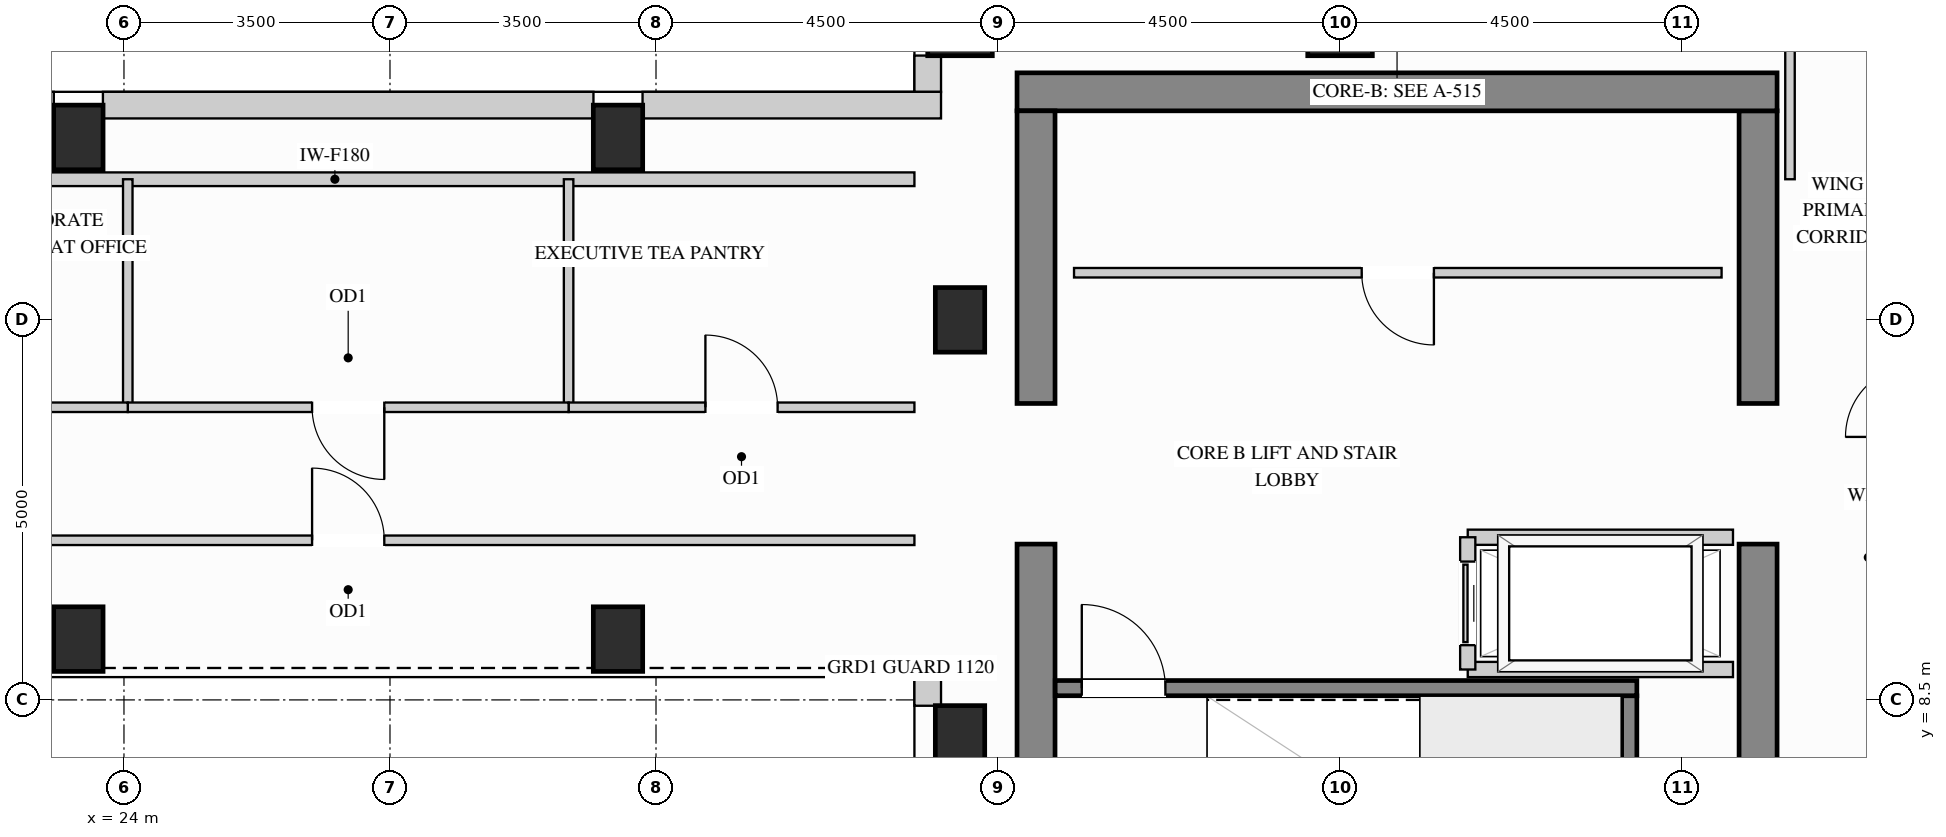
"""IFC4 building model, lengths in metres.
Left out: names, types, materials, properties, quantities, classifications, styles, units other than length and angle.
Written with IfcOpenShell. Run it as: python <this file> out.ifc"""

import sys

from ifc_helpers import new_model, si_unit, direction, frame, frame_2d, origin, origin_2d, place, context, subcontext, project, spatial, rectangle, extrude, source, transform, mapped, element, fill, save


model = new_model("IFC4")
c1 = context("Model", 3, precision=1e-05, world=origin(), true_north=direction((0.0, 1.0)))
c2 = subcontext(c1, "Body", "Model", "MODEL_VIEW")
j1 = project(units=[si_unit("LENGTHUNIT", "METRE"), si_unit("PLANEANGLEUNIT", "RADIAN")], contexts=[c1])
p1 = place(None, origin())
s1 = spatial("IfcSite", under=j1, at=p1, CompositionType="ELEMENT")
p2 = place(p1, origin())
s2 = spatial("IfcBuilding", under=s1, at=p2, CompositionType="ELEMENT")
p3 = place(p2, frame((0.0, 0.0, 244.8)))
s3 = spatial("IfcBuildingStorey", under=s2, at=p3, CompositionType="ELEMENT", Elevation=244.8)
m1 = source(origin(), c2, "Body", "SweptSolid", [
    extrude(rectangle(XDim=0.65, YDim=0.85, at=origin_2d()), origin(), (0.0, 0.0, 1.0), 3.4),
])
for number, where, z_axis, x_axis in (
    (1, (35.0, 13.5, 0.0), (0.0, 0.0, 1.0), (1.0, 0.0, 0.0)),
    (2, (35.0, 8.0, 0.0), (0.0, 0.0, 1.0), (1.0, 0.0, 0.0)),
    (3, (23.4, 15.9, 0.0), (0.0, 0.0, 1.0), (1.0, 0.0, 0.0)),
    (4, (23.4, 9.3, 0.0), (0.0, 0.0, 1.0), (1.0, 0.0, 0.0)),
    (5, (30.5, 15.9, 0.0), (0.0, 0.0, 1.0), (1.0, 0.0, 0.0)),
    (6, (30.5, 9.3, 0.0), (0.0, 0.0, 1.0), (1.0, 0.0, 0.0)),
):
    element("IfcColumn", number, at=place(p3, frame(where, z_axis=z_axis, x_axis=x_axis)), inside=s3, PredefinedType="COLUMN", context=c2, shape_type="MappedRepresentation", body=[
        mapped(m1, transform((0.0, 0.0, 0.0), x_axis=(1.0, 0.0, 0.0), y_axis=(0.0, 1.0, 0.0), z_axis=(0.0, 0.0, 1.0))),
    ])
m2 = source(origin(), c2, "Body", "SweptSolid", [
    extrude(rectangle(XDim=0.85, YDim=0.85, at=origin_2d()), origin(), (0.0, 0.0, 1.0), 3.4),
])
for number, where, z_axis, x_axis in (
    (7, (35.0, 17.4, 0.0), (0.0, 0.0, 1.0), (1.0, 0.0, 0.0)),
    (8, (40.0, 17.4, 0.0), (0.0, 0.0, 1.0), (1.0, 0.0, 0.0)),
):
    element("IfcColumn", number, at=place(p3, frame(where, z_axis=z_axis, x_axis=x_axis)), inside=s3, PredefinedType="COLUMN", context=c2, shape_type="MappedRepresentation", body=[
        mapped(m2, transform((0.0, 0.0, 0.0), x_axis=(1.0, 0.0, 0.0), y_axis=(0.0, 1.0, 0.0), z_axis=(0.0, 0.0, 1.0))),
    ])
m3 = source(origin(), c2, "Body", "SweptSolid", [
    extrude(rectangle(XDim=5.8, YDim=0.5, at=frame_2d((2.9, 0.0))), origin(), (0.0, 0.0, 1.0), 3.4),
])
p4 = place(p3, frame((45.5, 4.75, 0.0), z_axis=(0.0, 0.0, 1.0), x_axis=(0.0, 1.0, 0.0)))
e9 = element("IfcWall", 9, at=p4, inside=s3, PredefinedType="SHEAR", context=c2, shape_type="MappedRepresentation", body=[
    mapped(m3, transform((0.0, 0.0, 0.0), x_axis=(1.0, 0.0, 0.0), y_axis=(0.0, 1.0, 0.0), z_axis=(0.0, 0.0, 1.0))),
])
m4 = source(origin(), c2, "Body", "SweptSolid", [
    extrude(rectangle(XDim=3.85, YDim=0.5, at=frame_2d((1.925, 0.0))), origin(), (0.0, 0.0, 1.0), 3.4),
])
p5 = place(p3, frame((45.5, 12.4, 0.0), z_axis=(0.0, 0.0, 1.0), x_axis=(0.0, 1.0, 0.0)))
e10 = element("IfcWall", 10, at=p5, inside=s3, PredefinedType="SHEAR", context=c2, shape_type="MappedRepresentation", body=[
    mapped(m4, transform((0.0, 0.0, 0.0), x_axis=(1.0, 0.0, 0.0), y_axis=(0.0, 1.0, 0.0), z_axis=(0.0, 0.0, 1.0))),
])
m5 = source(origin(), c2, "Body", "SweptSolid", [
    extrude(rectangle(XDim=10.0, YDim=0.5, at=frame_2d((5.0, 0.0))), origin(), (0.0, 0.0, 1.0), 3.4),
])
p6 = place(p3, frame((35.75, 16.5, 0.0), z_axis=(0.0, 0.0, 1.0), x_axis=(1.0, 0.0, 0.0)))
e11 = element("IfcWall", 11, at=p6, inside=s3, PredefinedType="SHEAR", context=c2, shape_type="MappedRepresentation", body=[
    mapped(m5, transform((0.0, 0.0, 0.0), x_axis=(1.0, 0.0, 0.0), y_axis=(0.0, 1.0, 0.0), z_axis=(0.0, 0.0, 1.0))),
])
p7 = place(p3, frame((36.0, 4.75, 0.0), z_axis=(0.0, 0.0, 1.0), x_axis=(0.0, 1.0, 0.0)))
e12 = element("IfcWall", 12, at=p7, inside=s3, PredefinedType="SHEAR", context=c2, shape_type="MappedRepresentation", body=[
    mapped(m3, transform((0.0, 0.0, 0.0), x_axis=(1.0, 0.0, 0.0), y_axis=(0.0, 1.0, 0.0), z_axis=(0.0, 0.0, 1.0))),
])
p8 = place(p3, frame((36.0, 12.4, 0.0), z_axis=(0.0, 0.0, 1.0), x_axis=(0.0, 1.0, 0.0)))
e13 = element("IfcWall", 13, at=p8, inside=s3, PredefinedType="SHEAR", context=c2, shape_type="MappedRepresentation", body=[
    mapped(m4, transform((0.0, 0.0, 0.0), x_axis=(1.0, 0.0, 0.0), y_axis=(0.0, 1.0, 0.0), z_axis=(0.0, 0.0, 1.0))),
])
m6 = source(origin(), c2, "Body", "SweptSolid", [
    extrude(rectangle(XDim=0.379, YDim=0.35, at=frame_2d((0.189, 0.0))), origin(), (0.0, 0.0, 1.0), 3.385),
])
p9 = place(p3, frame((34.575, 8.802, 0.0), z_axis=(0.0, 0.0, 1.0), x_axis=(0.0, -1.0, 0.0)))
e14 = element("IfcWall", 14, at=p9, inside=s3, PredefinedType="SOLIDWALL", context=c2, shape_type="MappedRepresentation", body=[
    mapped(m6, transform((0.0, 0.0, 0.0), x_axis=(1.0, 0.0, 0.0), y_axis=(0.0, 1.0, 0.0), z_axis=(0.0, 0.0, 1.0))),
])
m7 = source(origin(), c2, "Body", "SweptSolid", [
    extrude(rectangle(XDim=0.479, YDim=0.35, at=frame_2d((0.24, 0.0))), origin(), (0.0, 0.0, 1.0), 3.385),
])
p10 = place(p3, frame((34.575, 16.977, 0.0), z_axis=(0.0, 0.0, 1.0), x_axis=(0.0, -1.0, 0.0)))
e15 = element("IfcWall", 15, at=p10, inside=s3, PredefinedType="SOLIDWALL", context=c2, shape_type="MappedRepresentation", body=[
    mapped(m7, transform((0.0, 0.0, 0.0), x_axis=(1.0, 0.0, 0.0), y_axis=(0.0, 1.0, 0.0), z_axis=(0.0, 0.0, 1.0))),
])
m8 = source(origin(), c2, "Body", "SweptSolid", [
    extrude(rectangle(XDim=3.927, YDim=0.35, at=frame_2d((1.963, 0.0))), origin(), (0.0, 0.0, 1.0), 3.385),
])
p11 = place(p3, frame((34.75, 16.325, 0.0), z_axis=(0.0, 0.0, 1.0), x_axis=(-1.0, 0.0, 0.0)))
e16 = element("IfcWall", 16, at=p11, inside=s3, PredefinedType="SOLIDWALL", context=c2, shape_type="MappedRepresentation", body=[
    mapped(m8, transform((0.0, 0.0, 0.0), x_axis=(1.0, 0.0, 0.0), y_axis=(0.0, 1.0, 0.0), z_axis=(0.0, 0.0, 1.0))),
])
m9 = source(origin(), c2, "Body", "SweptSolid", [
    extrude(rectangle(XDim=6.454, YDim=0.35, at=frame_2d((3.227, 0.0))), origin(), (0.0, 0.0, 1.0), 3.385),
])
p12 = place(p3, frame((30.177, 16.325, 0.0), z_axis=(0.0, 0.0, 1.0), x_axis=(-1.0, 0.0, 0.0)))
e17 = element("IfcWall", 17, at=p12, inside=s3, PredefinedType="SOLIDWALL", context=c2, shape_type="MappedRepresentation", body=[
    mapped(m9, transform((0.0, 0.0, 0.0), x_axis=(1.0, 0.0, 0.0), y_axis=(0.0, 1.0, 0.0), z_axis=(0.0, 0.0, 1.0))),
])
p13 = place(p3, frame((23.077, 16.325, 0.0), z_axis=(0.0, 0.0, 1.0), x_axis=(-1.0, 0.0, 0.0)))
e18 = element("IfcWall", 18, at=p13, inside=s3, PredefinedType="SOLIDWALL", context=c2, shape_type="MappedRepresentation", body=[
    mapped(m8, transform((0.0, 0.0, 0.0), x_axis=(1.0, 0.0, 0.0), y_axis=(0.0, 1.0, 0.0), z_axis=(0.0, 0.0, 1.0))),
])
m10 = source(origin(), c2, "Body", "SweptSolid", [
    extrude(rectangle(XDim=15.25, YDim=0.18, at=frame_2d((7.625, 0.0))), origin(), (0.0, 0.0, 1.0), 3.385),
])
p14 = place(p3, frame((19.15, 15.35, 0.0), z_axis=(0.0, 0.0, 1.0), x_axis=(1.0, 0.0, 0.0)))
e19 = element("IfcWall", 19, at=p14, inside=s3, PredefinedType="PARTITIONING", context=c2, shape_type="MappedRepresentation", body=[
    mapped(m10, transform((0.0, 0.0, 0.0), x_axis=(1.0, 0.0, 0.0), y_axis=(0.0, 1.0, 0.0), z_axis=(0.0, 0.0, 1.0))),
])
p15 = place(p3, frame((36.5, 14.12, 0.0), z_axis=(0.0, 0.0, 1.0), x_axis=(1.0, 0.0, 0.0)))
e20 = element("IfcWall", 20, at=p15, inside=s3, PredefinedType="PARTITIONING", context=c2, shape_type="SweptSolid", body=[
    extrude(rectangle(XDim=8.52, YDim=0.125, at=frame_2d((4.26, 0.0))), origin(), (0.0, 0.0, 1.0), 3.385),
])
p16 = place(p15, frame((3.785, 0.0, 0.0)))
e21 = element("IfcOpeningElement", 21, at=p16, cuts=e20, PredefinedType="OPENING", context=c2, shape_type="SweptSolid", body=[
    extrude(rectangle(XDim=0.95, YDim=2.15, at=frame_2d((0.475, 1.075))), frame((0.0, 0.073, 0.0), z_axis=(0.0, -1.0, 0.0), x_axis=(1.0, 0.0, 0.0)), (0.0, 0.0, 1.0), 0.145),
])
m11 = source(origin(), c2, "Body", "SweptSolid", [
    extrude(rectangle(XDim=2.298, YDim=0.125, at=frame_2d((1.149, 0.0))), origin(), (0.0, 0.0, 1.0), 3.385),
])
p17 = place(p3, frame((45.92, 15.35, 0.0), z_axis=(0.0, 0.0, 1.0), x_axis=(0.0, 1.0, 0.0)))
e22 = element("IfcWall", 22, at=p17, inside=s3, PredefinedType="PARTITIONING", context=c2, shape_type="MappedRepresentation", body=[
    mapped(m11, transform((0.0, 0.0, 0.0), x_axis=(1.0, 0.0, 0.0), y_axis=(0.0, 1.0, 0.0), z_axis=(0.0, 0.0, 1.0))),
])
m12 = source(origin(), c2, "Body", "SweptSolid", [
    extrude(rectangle(XDim=3.0, YDim=0.125, at=frame_2d((1.5, 0.0))), origin(), (0.0, 0.0, 1.0), 3.385),
])
for number, where, z_axis, x_axis in (
    (23, (24.05, 12.35, 0.0), (0.0, 0.0, 1.0), (0.0, 1.0, 0.0)),
    (24, (29.85, 12.35, 0.0), (0.0, 0.0, 1.0), (0.0, 1.0, 0.0)),
):
    element("IfcWall", number, at=place(p3, frame(where, z_axis=z_axis, x_axis=x_axis)), inside=s3, PredefinedType="PARTITIONING", context=c2, shape_type="MappedRepresentation", body=[
        mapped(m12, transform((0.0, 0.0, 0.0), x_axis=(1.0, 0.0, 0.0), y_axis=(0.0, 1.0, 0.0), z_axis=(0.0, 0.0, 1.0))),
    ])
p18 = place(p3, frame((29.85, 12.35, 0.0), z_axis=(0.0, 0.0, 1.0), x_axis=(1.0, 0.0, 0.0)))
e25 = element("IfcWall", 25, at=p18, inside=s3, PredefinedType="PARTITIONING", context=c2, shape_type="SweptSolid", body=[
    extrude(rectangle(XDim=4.55, YDim=0.125, at=frame_2d((2.275, 0.0))), origin(), (0.0, 0.0, 1.0), 3.385),
])
p19 = place(p18, frame((1.8, 0.0, 0.0)))
e26 = element("IfcOpeningElement", 26, at=p19, cuts=e25, PredefinedType="OPENING", context=c2, shape_type="SweptSolid", body=[
    extrude(rectangle(XDim=0.95, YDim=2.15, at=frame_2d((0.475, 1.075))), frame((0.0, 0.073, 0.0), z_axis=(0.0, -1.0, 0.0), x_axis=(1.0, 0.0, 0.0)), (0.0, 0.0, 1.0), 0.145),
])
p20 = place(p3, frame((24.05, 12.35, 0.0), z_axis=(0.0, 0.0, 1.0), x_axis=(1.0, 0.0, 0.0)))
e27 = element("IfcWall", 27, at=p20, inside=s3, PredefinedType="PARTITIONING", context=c2, shape_type="SweptSolid", body=[
    extrude(rectangle(XDim=5.8, YDim=0.125, at=frame_2d((2.9, 0.0))), origin(), (0.0, 0.0, 1.0), 3.385),
])
p21 = place(p20, frame((2.425, 0.0, 0.0)))
e28 = element("IfcOpeningElement", 28, at=p21, cuts=e27, PredefinedType="OPENING", context=c2, shape_type="SweptSolid", body=[
    extrude(rectangle(XDim=0.95, YDim=2.15, at=frame_2d((0.475, 1.075))), frame((0.0, 0.073, 0.0), z_axis=(0.0, -1.0, 0.0), x_axis=(1.0, 0.0, 0.0)), (0.0, 0.0, 1.0), 0.145),
])
p22 = place(p3, frame((19.5, 12.35, 0.0), z_axis=(0.0, 0.0, 1.0), x_axis=(1.0, 0.0, 0.0)))
e29 = element("IfcWall", 29, at=p22, inside=s3, PredefinedType="PARTITIONING", context=c2, shape_type="SweptSolid", body=[
    extrude(rectangle(XDim=4.55, YDim=0.125, at=frame_2d((2.275, 0.0))), origin(), (0.0, 0.0, 1.0), 3.385),
])
p23 = place(p22, frame((1.8, 0.0, 0.0)))
e30 = element("IfcOpeningElement", 30, at=p23, cuts=e29, PredefinedType="OPENING", context=c2, shape_type="SweptSolid", body=[
    extrude(rectangle(XDim=0.95, YDim=2.15, at=frame_2d((0.475, 1.075))), frame((0.0, 0.073, 0.0), z_axis=(0.0, -1.0, 0.0), x_axis=(1.0, 0.0, 0.0)), (0.0, 0.0, 1.0), 0.145),
])
p24 = place(p3, frame((19.5, 10.6, 0.0), z_axis=(0.0, 0.0, 1.0), x_axis=(1.0, 0.0, 0.0)))
e31 = element("IfcWall", 31, at=p24, inside=s3, PredefinedType="PARTITIONING", context=c2, shape_type="SweptSolid", body=[
    extrude(rectangle(XDim=14.9, YDim=0.125, at=frame_2d((7.45, 0.0))), origin(), (0.0, 0.0, 1.0), 3.385),
])
p25 = place(p24, frame((6.975, 0.0, 0.0)))
e32 = element("IfcOpeningElement", 32, at=p25, cuts=e31, PredefinedType="OPENING", context=c2, shape_type="SweptSolid", body=[
    extrude(rectangle(XDim=0.95, YDim=2.15, at=frame_2d((0.475, 1.075))), frame((0.0, 0.073, 0.0), z_axis=(0.0, -1.0, 0.0), x_axis=(1.0, 0.0, 0.0)), (0.0, 0.0, 1.0), 0.145),
])
m13 = source(origin(), c2, "Body", "SweptSolid", [
    extrude(rectangle(XDim=3.49, YDim=0.2, at=frame_2d((1.745, 0.0))), origin(), (0.0, 0.0, 1.0), 3.385),
])
for number, where, z_axis, x_axis in (
    (33, (41.68, 10.64, 0.0), (0.0, 0.0, 1.0), (1.0, 0.0, 0.0)),
    (34, (41.68, 8.9, 0.0), (0.0, 0.0, 1.0), (1.0, 0.0, 0.0)),
):
    element("IfcWall", number, at=place(p3, frame(where, z_axis=z_axis, x_axis=x_axis)), inside=s3, PredefinedType="PARTITIONING", context=c2, shape_type="MappedRepresentation", body=[
        mapped(m13, transform((0.0, 0.0, 0.0), x_axis=(1.0, 0.0, 0.0), y_axis=(0.0, 1.0, 0.0), z_axis=(0.0, 0.0, 1.0))),
    ])
p26 = place(p3, frame((41.68, 8.9, 0.0), z_axis=(0.0, 0.0, 1.0), x_axis=(0.0, 1.0, 0.0)))
e35 = element("IfcWall", 35, at=p26, inside=s3, PredefinedType="PARTITIONING", context=c2, shape_type="SweptSolid", body=[
    extrude(rectangle(XDim=1.74, YDim=0.2, at=frame_2d((0.87, 0.0))), origin(), (0.0, 0.0, 1.0), 3.385),
])
p27 = place(p26, frame((0.32, 0.0, 0.0)))
e36 = element("IfcOpeningElement", 36, at=p27, cuts=e35, PredefinedType="OPENING", context=c2, shape_type="SweptSolid", body=[
    extrude(rectangle(XDim=1.1, YDim=2.2, at=frame_2d((0.55, 1.1))), frame((0.0, 0.11, 0.0), z_axis=(0.0, -1.0, 0.0), x_axis=(1.0, 0.0, 0.0)), (0.0, 0.0, 1.0), 0.22),
])
m14 = source(origin(), c2, "Body", "SweptSolid", [
    extrude(rectangle(XDim=3.803, YDim=0.2, at=frame_2d((1.901, 0.0))), origin(), (0.0, 0.0, 1.0), 3.4),
])
p28 = place(p3, frame((43.805, 4.752, 0.0), z_axis=(0.0, 0.0, 1.0), x_axis=(0.0, 1.0, 0.0)))
e37 = element("IfcWall", 37, at=p28, inside=s3, PredefinedType="SHEAR", context=c2, shape_type="MappedRepresentation", body=[
    mapped(m14, transform((0.0, 0.0, 0.0), x_axis=(1.0, 0.0, 0.0), y_axis=(0.0, 1.0, 0.0), z_axis=(0.0, 0.0, 1.0))),
])
p29 = place(p3, frame((36.252, 8.655, 0.0), z_axis=(0.0, 0.0, 1.0), x_axis=(1.0, 0.0, 0.0)))
e38 = element("IfcWall", 38, at=p29, inside=s3, PredefinedType="SHEAR", context=c2, shape_type="SweptSolid", body=[
    extrude(rectangle(XDim=7.653, YDim=0.2, at=frame_2d((3.827, 0.0))), origin(), (0.0, 0.0, 1.0), 3.4),
])
p30 = place(p29, frame((0.35, 0.0, 0.0)))
e39 = element("IfcOpeningElement", 39, at=p30, cuts=e38, PredefinedType="OPENING", context=c2, shape_type="SweptSolid", body=[
    extrude(rectangle(XDim=1.1, YDim=2.15, at=frame_2d((0.55, 1.075))), frame((0.0, 0.11, 0.0), z_axis=(0.0, -1.0, 0.0), x_axis=(1.0, 0.0, 0.0)), (0.0, 0.0, 1.0), 0.22),
])
m15 = source(origin(), c2, "Body", "SweptSolid", [
    extrude(rectangle(XDim=1.1, YDim=2.2, at=frame_2d((0.55, 1.1))), frame((0.0, 0.025, 0.0), z_axis=(0.0, -1.0, 0.0), x_axis=(1.0, 0.0, 0.0)), (0.0, 0.0, 1.0), 0.05),
])
p31 = place(p27, origin())
e40 = element("IfcDoor", 40, at=p31, inside=s3, OperationType="SLIDING_TO_LEFT", PredefinedType="DOOR", context=c2, shape_type="MappedRepresentation", body=[
    mapped(m15, transform((0.0, 0.0, 0.0), x_axis=(1.0, 0.0, 0.0), y_axis=(0.0, 1.0, 0.0), z_axis=(0.0, 0.0, 1.0))),
])
fill(e36, e40)
m16 = source(origin(), c2, "Body", "SweptSolid", [
    extrude(rectangle(XDim=0.95, YDim=2.15, at=frame_2d((0.475, 1.075))), frame((0.0, 0.025, 0.0), z_axis=(0.0, -1.0, 0.0), x_axis=(1.0, 0.0, 0.0)), (0.0, 0.0, 1.0), 0.05),
])
p32 = place(p16, origin())
e41 = element("IfcDoor", 41, at=p32, inside=s3, OperationType="SINGLE_SWING_RIGHT", PredefinedType="DOOR", context=c2, shape_type="MappedRepresentation", body=[
    mapped(m16, transform((0.0, 0.0, 0.0), x_axis=(1.0, 0.0, 0.0), y_axis=(0.0, 1.0, 0.0), z_axis=(0.0, 0.0, 1.0))),
])
fill(e21, e41)
p33 = place(p21, origin())
e42 = element("IfcDoor", 42, at=p33, inside=s3, OperationType="SINGLE_SWING_RIGHT", PredefinedType="DOOR", context=c2, shape_type="MappedRepresentation", body=[
    mapped(m16, transform((0.0, 0.0, 0.0), x_axis=(1.0, 0.0, 0.0), y_axis=(0.0, 1.0, 0.0), z_axis=(0.0, 0.0, 1.0))),
])
fill(e28, e42)
p34 = place(p19, origin())
e43 = element("IfcDoor", 43, at=p34, inside=s3, OperationType="SINGLE_SWING_LEFT", PredefinedType="DOOR", context=c2, shape_type="MappedRepresentation", body=[
    mapped(m16, transform((0.0, 0.0, 0.0), x_axis=(1.0, 0.0, 0.0), y_axis=(0.0, 1.0, 0.0), z_axis=(0.0, 0.0, 1.0))),
])
fill(e26, e43)
p35 = place(p25, origin())
e44 = element("IfcDoor", 44, at=p35, inside=s3, OperationType="SINGLE_SWING_LEFT", PredefinedType="DOOR", context=c2, shape_type="MappedRepresentation", body=[
    mapped(m16, transform((0.0, 0.0, 0.0), x_axis=(1.0, 0.0, 0.0), y_axis=(0.0, 1.0, 0.0), z_axis=(0.0, 0.0, 1.0))),
])
fill(e32, e44)
m17 = source(origin(), c2, "Body", "SweptSolid", [
    extrude(rectangle(XDim=1.1, YDim=2.15, at=frame_2d((0.55, 1.075))), frame((0.0, 0.025, 0.0), z_axis=(0.0, -1.0, 0.0), x_axis=(1.0, 0.0, 0.0)), (0.0, 0.0, 1.0), 0.05),
])
p36 = place(p30, origin())
e45 = element("IfcDoor", 45, at=p36, inside=s3, OperationType="SINGLE_SWING_LEFT", PredefinedType="DOOR", context=c2, shape_type="MappedRepresentation", body=[
    mapped(m17, transform((0.0, 0.0, 0.0), x_axis=(1.0, 0.0, 0.0), y_axis=(0.0, 1.0, 0.0), z_axis=(0.0, 0.0, 1.0))),
])
fill(e39, e45)
save(model, sys.argv[1])
